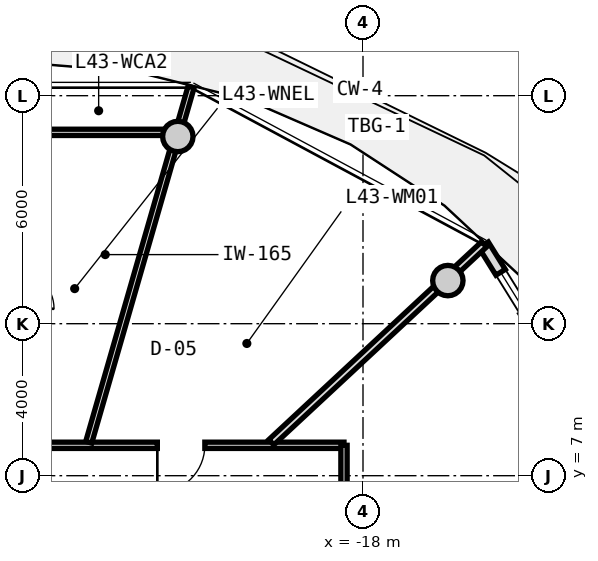
"""IFC4 building model, lengths in metres.
Left out: names, types, materials, properties, quantities, classifications, styles, units other than length and angle.
Written with IfcOpenShell. Run it as: python <this file> out.ifc"""

import sys

from ifc_helpers import new_model, si_unit, direction, frame, frame_2d, origin, origin_2d, place, context, subcontext, project, spatial, rectangle, circle, extrude, source, transform, mapped, element, fill, save


model = new_model("IFC4")
c1 = context("Model", 3, precision=1e-05, world=origin(), true_north=direction((0.0, 1.0)))
c2 = subcontext(c1, "Body", "Model", "MODEL_VIEW")
j1 = project(units=[si_unit("LENGTHUNIT", "METRE"), si_unit("PLANEANGLEUNIT", "RADIAN")], contexts=[c1])
p1 = place(None, origin())
s1 = spatial("IfcSite", under=j1, at=p1, CompositionType="ELEMENT")
p2 = place(p1, origin())
s2 = spatial("IfcBuilding", under=s1, at=p2, CompositionType="ELEMENT")
p3 = place(p2, frame((0.0, 0.0, 140.4)))
s3 = spatial("IfcBuildingStorey", under=s2, at=p3, CompositionType="ELEMENT", Elevation=140.4)
m1 = source(origin(), c2, "Body", "SweptSolid", [
    extrude(circle(Radius=0.4, at=origin_2d()), origin(), (0.0, 0.0, 1.0), 3.05),
])
for number, where, z_axis, x_axis in (
    (1, (-15.767, 12.135, 0.0), (0.0, 0.0, 1.0), (1.0, 0.0, 0.0)),
    (2, (-22.873, 15.926, 0.0), (0.0, 0.0, 1.0), (1.0, 0.0, 0.0)),
):
    element("IfcColumn", number, at=place(p3, frame(where, z_axis=z_axis, x_axis=x_axis)), inside=s3, PredefinedType="COLUMN", context=c2, shape_type="MappedRepresentation", body=[
        mapped(m1, transform((0.0, 0.0, 0.0), x_axis=(1.0, 0.0, 0.0), y_axis=(0.0, 1.0, 0.0), z_axis=(0.0, 0.0, 1.0), scale=1.0)),
    ])
m2 = source(origin(), c2, "Body", "SweptSolid", [
    extrude(rectangle(XDim=8.431, YDim=0.29, at=frame_2d((4.216, 0.0))), origin(), (0.0, 0.0, 1.0), 2.81),
])
p4 = place(p3, frame((-14.827, 13.075, 0.0), z_axis=(0.0, 0.0, 1.0), x_axis=(0.527377998418, -0.849630770855, 0.0)))
e3 = element("IfcWall", 3, at=p4, inside=s3, PredefinedType="SOLIDWALL", context=c2, shape_type="MappedRepresentation", body=[
    mapped(m2, transform((0.0, 0.0, 0.0), x_axis=(1.0, 0.0, 0.0), y_axis=(0.0, 1.0, 0.0), z_axis=(0.0, 0.0, 1.0), scale=1.0)),
])
p5 = place(p4, frame((6.34, 0.0, 0.0)))
e4 = element("IfcOpeningElement", 4, at=p5, cuts=e3, PredefinedType="OPENING", context=c2, shape_type="SweptSolid", body=[
    extrude(rectangle(XDim=1.15, YDim=2.25, at=frame_2d((0.575, 1.125))), frame((0.0, 0.155, 0.0), z_axis=(0.0, -1.0, 0.0), x_axis=(1.0, 0.0, 0.0)), (0.0, 0.0, 1.0), 0.31),
])
p6 = place(p4, frame((0.85, 0.0, 0.85)))
e5 = element("IfcOpeningElement", 5, at=p6, cuts=e3, PredefinedType="OPENING", context=c2, shape_type="SweptSolid", body=[
    extrude(rectangle(XDim=1.2, YDim=1.5, at=frame_2d((0.6, 0.75))), frame((0.0, 0.155, 0.0), z_axis=(0.0, -1.0, 0.0), x_axis=(1.0, 0.0, 0.0)), (0.0, 0.0, 1.0), 0.31),
])
m3 = source(origin(), c2, "Body", "SweptSolid", [
    extrude(rectangle(XDim=8.6, YDim=0.165, at=frame_2d((4.3, 0.0))), origin(), (0.0, 0.0, 1.0), 2.795),
])
p7 = place(p3, frame((-27.1, 7.8, 0.0), z_axis=(0.0, 0.0, 1.0), x_axis=(1.0, 0.0, 0.0)))
e6 = element("IfcWall", 6, at=p7, inside=s3, PredefinedType="PARTITIONING", context=c2, shape_type="MappedRepresentation", body=[
    mapped(m3, transform((0.0, 0.0, 0.0), x_axis=(1.0, 0.0, 0.0), y_axis=(0.0, 1.0, 0.0), z_axis=(0.0, 0.0, 1.0), scale=1.0)),
])
p8 = place(p7, frame((3.688, 0.0, 0.0)))
e7 = element("IfcOpeningElement", 7, at=p8, cuts=e6, PredefinedType="OPENING", context=c2, shape_type="SweptSolid", body=[
    extrude(rectangle(XDim=1.25, YDim=2.2, at=frame_2d((0.625, 1.1))), frame((0.0, 0.093, 0.0), z_axis=(0.0, -1.0, 0.0), x_axis=(1.0, 0.0, 0.0)), (0.0, 0.0, 1.0), 0.185),
])
m4 = source(origin(), c2, "Body", "SweptSolid", [
    extrude(rectangle(XDim=15.6, YDim=0.165, at=frame_2d((7.8, 0.0))), origin(), (0.0, 0.0, 1.0), 2.795),
])
p9 = place(p3, frame((-18.5, 7.8, 0.0), z_axis=(0.0, 0.0, 1.0), x_axis=(0.0, -1.0, 0.0)))
e8 = element("IfcWall", 8, at=p9, inside=s3, PredefinedType="PARTITIONING", context=c2, shape_type="MappedRepresentation", body=[
    mapped(m4, transform((0.0, 0.0, 0.0), x_axis=(1.0, 0.0, 0.0), y_axis=(0.0, 1.0, 0.0), z_axis=(0.0, 0.0, 1.0), scale=1.0)),
])
p10 = place(p9, frame((10.881, 0.0, 0.0)))
e9 = element("IfcOpeningElement", 9, at=p10, cuts=e8, PredefinedType="OPENING", context=c2, shape_type="SweptSolid", body=[
    extrude(rectangle(XDim=1.05, YDim=2.15, at=frame_2d((0.525, 1.075))), frame((0.0, 0.093, 0.0), z_axis=(0.0, -1.0, 0.0), x_axis=(1.0, 0.0, 0.0)), (0.0, 0.0, 1.0), 0.185),
])
p11 = place(p9, frame((8.844, 0.0, 0.0)))
e10 = element("IfcOpeningElement", 10, at=p11, cuts=e8, PredefinedType="OPENING", context=c2, shape_type="SweptSolid", body=[
    extrude(rectangle(XDim=1.05, YDim=2.15, at=frame_2d((0.525, 1.075))), frame((0.0, 0.093, 0.0), z_axis=(0.0, -1.0, 0.0), x_axis=(1.0, 0.0, 0.0)), (0.0, 0.0, 1.0), 0.185),
])
p12 = place(p9, frame((3.596, 0.0, 0.0)))
e11 = element("IfcOpeningElement", 11, at=p12, cuts=e8, PredefinedType="OPENING", context=c2, shape_type="SweptSolid", body=[
    extrude(rectangle(XDim=1.25, YDim=2.2, at=frame_2d((0.625, 1.1))), frame((0.0, 0.093, 0.0), z_axis=(0.0, -1.0, 0.0), x_axis=(1.0, 0.0, 0.0)), (0.0, 0.0, 1.0), 0.185),
])
m5 = source(origin(), c2, "Body", "SweptSolid", [
    extrude(rectangle(XDim=9.73, YDim=0.165, at=frame_2d((4.865, 0.0))), origin(), (0.0, 0.0, 1.0), 2.345),
])
p13 = place(p3, frame((-25.217, 7.88, 0.0), z_axis=(0.0, 0.0, 1.0), x_axis=(0.27679492614, 0.960929013436, 0.0)))
e12 = element("IfcWall", 12, at=p13, inside=s3, PredefinedType="PARTITIONING", context=c2, shape_type="MappedRepresentation", body=[
    mapped(m5, transform((0.0, 0.0, 0.0), x_axis=(1.0, 0.0, 0.0), y_axis=(0.0, 1.0, 0.0), z_axis=(0.0, 0.0, 1.0), scale=1.0)),
])
m6 = source(origin(), c2, "Body", "SweptSolid", [
    extrude(rectangle(XDim=4.469, YDim=0.165, at=frame_2d((2.234, 0.0))), origin(), (0.0, 0.0, 1.0), 2.345),
])
p14 = place(p3, frame((-27.18, 16.035, 0.0), z_axis=(0.0, 0.0, 1.0), x_axis=(1.0, 0.0, 0.0)))
e13 = element("IfcWall", 13, at=p14, inside=s3, PredefinedType="PARTITIONING", context=c2, shape_type="MappedRepresentation", body=[
    mapped(m6, transform((0.0, 0.0, 0.0), x_axis=(1.0, 0.0, 0.0), y_axis=(0.0, 1.0, 0.0), z_axis=(0.0, 0.0, 1.0), scale=1.0)),
])
m7 = source(origin(), c2, "Body", "SweptSolid", [
    extrude(rectangle(XDim=7.648, YDim=0.19, at=frame_2d((3.824, 0.0))), origin(), (0.0, 0.0, 1.0), 2.345),
])
p15 = place(p3, frame((-20.413, 7.88, 0.0), z_axis=(0.0, 0.0, 1.0), x_axis=(0.732182665826, 0.681108320213, 0.0)))
e14 = element("IfcWall", 14, at=p15, inside=s3, PredefinedType="PARTITIONING", context=c2, shape_type="MappedRepresentation", body=[
    mapped(m7, transform((0.0, 0.0, 0.0), x_axis=(1.0, 0.0, 0.0), y_axis=(0.0, 1.0, 0.0), z_axis=(0.0, 0.0, 1.0), scale=1.0)),
])
m8 = source(origin(), c2, "Body", "SweptSolid", [
    extrude(rectangle(XDim=1.2, YDim=1.5, at=frame_2d((0.6, 0.75))), frame((0.0, 0.03, 0.0), z_axis=(0.0, -1.0, 0.0), x_axis=(1.0, 0.0, 0.0)), (0.0, 0.0, 1.0), 0.06),
])
p16 = place(p6, origin())
e15 = element("IfcWindow", 15, at=p16, inside=s3, PartitioningType="SINGLE_PANEL", PredefinedType="WINDOW", context=c2, shape_type="MappedRepresentation", body=[
    mapped(m8, transform((0.0, 0.0, 0.0), x_axis=(1.0, 0.0, 0.0), y_axis=(0.0, 1.0, 0.0), z_axis=(0.0, 0.0, 1.0), scale=1.0)),
])
fill(e5, e15)
m9 = source(origin(), c2, "Body", "SweptSolid", [
    extrude(rectangle(XDim=1.25, YDim=2.2, at=frame_2d((0.625, 1.1))), frame((0.0, 0.025, 0.0), z_axis=(0.0, -1.0, 0.0), x_axis=(1.0, 0.0, 0.0)), (0.0, 0.0, 1.0), 0.05),
])
p17 = place(p8, frame((1.25, 0.0, 0.0), z_axis=(0.0, 0.0, 1.0), x_axis=(-1.0, 0.0, 0.0)))
e16 = element("IfcDoor", 16, at=p17, inside=s3, OperationType="SINGLE_SWING_RIGHT", PredefinedType="DOOR", context=c2, shape_type="MappedRepresentation", body=[
    mapped(m9, transform((0.0, 0.0, 0.0), x_axis=(1.0, 0.0, 0.0), y_axis=(0.0, 1.0, 0.0), z_axis=(0.0, 0.0, 1.0), scale=1.0)),
])
fill(e7, e16)
save(model, sys.argv[1])
